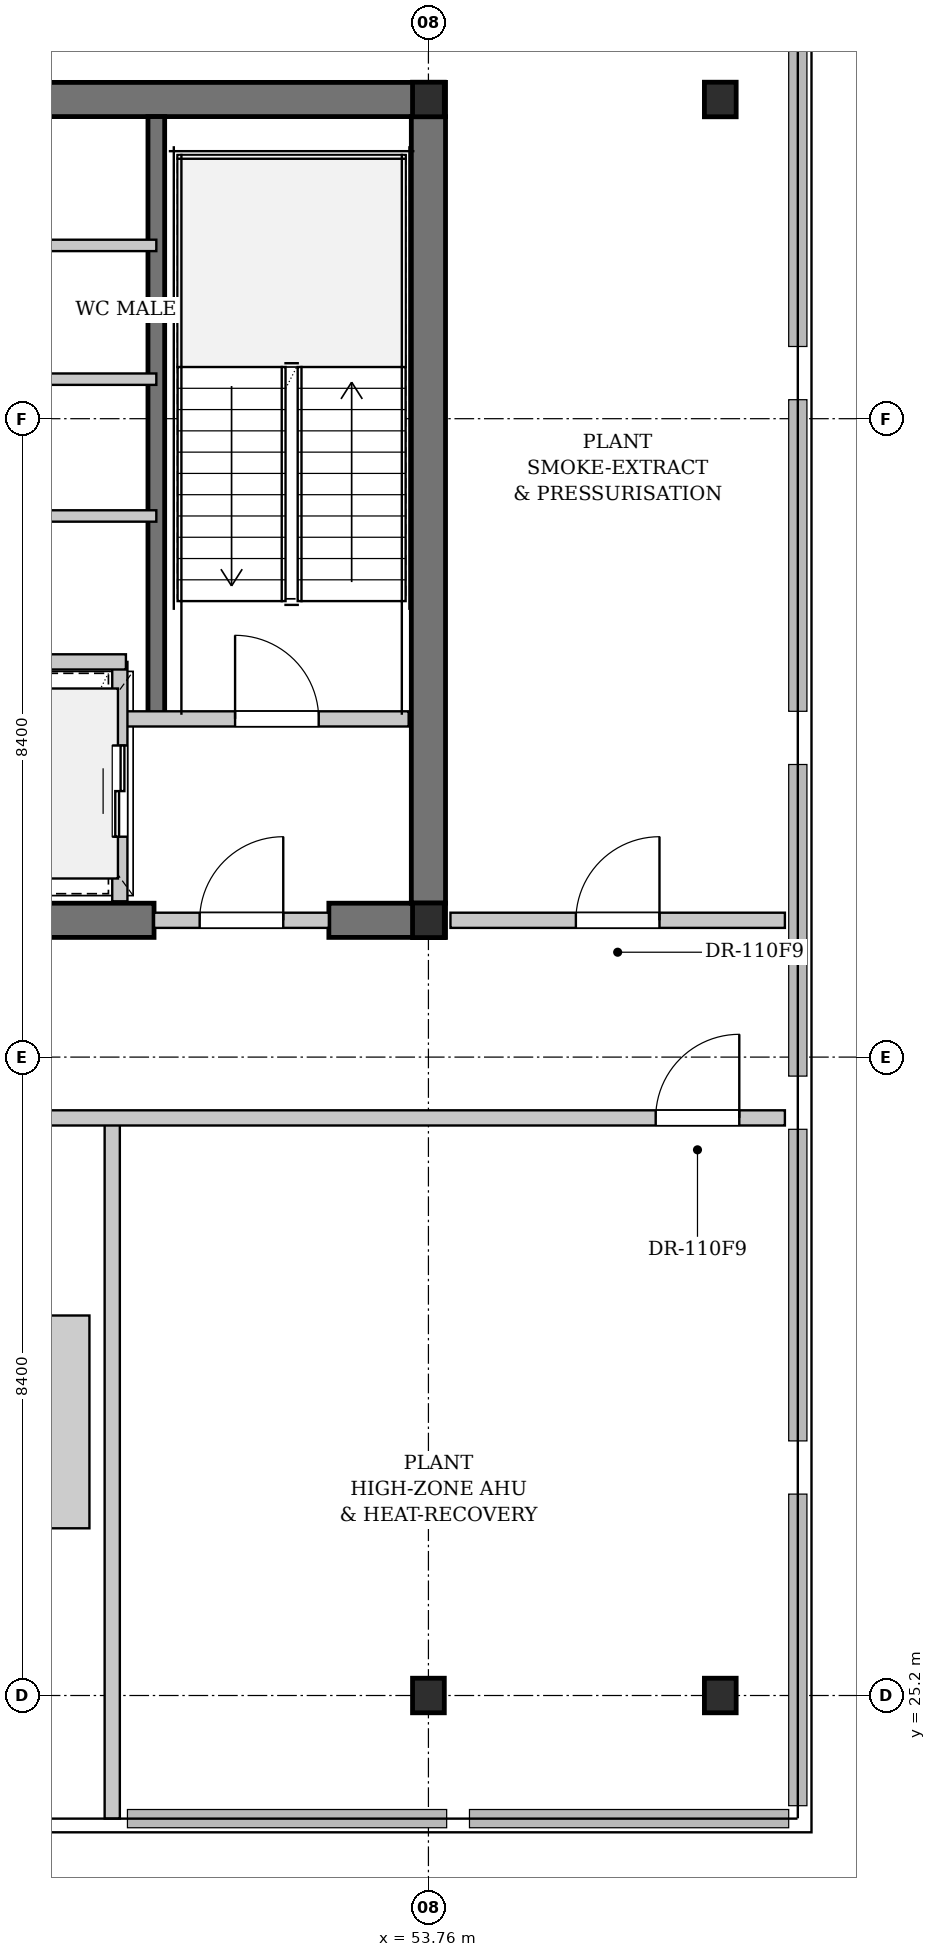
"""IFC4 building model, lengths in metres.
Left out: names, types, materials, properties, quantities, classifications, styles, units other than length and angle.
Written with IfcOpenShell. Run it as: python <this file> out.ifc"""

import sys

from ifc_helpers import new_model, si_unit, direction, frame, frame_2d, origin, origin_2d, place, context, subcontext, project, spatial, rectangle, i_section, extrude, element, fill, save


model = new_model("IFC4")
c1 = context("Model", 3, precision=1e-05, world=origin(), true_north=direction((0.0, 1.0)))
c2 = subcontext(c1, "Body", "Model", "MODEL_VIEW")
j1 = project(units=[si_unit("LENGTHUNIT", "METRE"), si_unit("PLANEANGLEUNIT", "RADIAN")], contexts=[c1])
p1 = place(None, origin())
s1 = spatial("IfcSite", under=j1, at=p1, CompositionType="ELEMENT")
p2 = place(p1, origin())
s2 = spatial("IfcBuilding", under=s1, at=p2, CompositionType="ELEMENT")
p3 = place(p2, frame((0.0, 0.0, 196.1)))
s3 = spatial("IfcBuildingStorey", under=s2, at=p3, CompositionType="ELEMENT", Elevation=196.1)
p4 = place(p3, frame((22.815, 46.2, 0.0), z_axis=(0.0, 0.0, 1.0), x_axis=(1.0, 0.0, 0.0)))
e1 = element("IfcWall", 1, at=p4, inside=s3, PredefinedType="SHEAR", context=c2, shape_type="SweptSolid", body=[
    extrude(rectangle(XDim=31.17, YDim=0.45, at=frame_2d((15.585, 0.0))), origin(), (0.0, 0.0, 1.0), 3.78),
])
p5 = place(p3, frame((42.1, 35.4, 0.0), z_axis=(0.0, 0.0, 1.0), x_axis=(1.0, 0.0, 0.0)))
e2 = element("IfcWall", 2, at=p5, inside=s3, PredefinedType="SHEAR", context=c2, shape_type="SweptSolid", body=[
    extrude(rectangle(XDim=8.05, YDim=0.45, at=frame_2d((4.025, 0.0))), origin(), (0.0, 0.0, 1.0), 3.78),
])
p6 = place(p5, frame((4.85, 0.0, 0.0)))
e3 = element("IfcOpeningElement", 3, at=p6, cuts=e2, PredefinedType="OPENING", context=c2, shape_type="SweptSolid", body=[
    extrude(rectangle(XDim=0.9, YDim=2.15, at=frame_2d((0.45, 1.075))), frame((0.0, 0.235, 0.0), z_axis=(0.0, -1.0, 0.0), x_axis=(1.0, 0.0, 0.0)), (0.0, 0.0, 1.0), 0.47),
])
p7 = place(p3, frame((52.45, 35.4, 0.0), z_axis=(0.0, 0.0, 1.0), x_axis=(1.0, 0.0, 0.0)))
e4 = element("IfcWall", 4, at=p7, inside=s3, PredefinedType="SHEAR", context=c2, shape_type="SweptSolid", body=[
    extrude(rectangle(XDim=1.535, YDim=0.45, at=frame_2d((0.768, 0.0))), origin(), (0.0, 0.0, 1.0), 3.78),
])
p8 = place(p3, frame((53.76, 35.625, 0.0), z_axis=(0.0, 0.0, 1.0), x_axis=(0.0, 1.0, 0.0)))
e5 = element("IfcWall", 5, at=p8, inside=s3, PredefinedType="SHEAR", context=c2, shape_type="SweptSolid", body=[
    extrude(rectangle(XDim=10.35, YDim=0.45, at=frame_2d((5.175, 0.0))), origin(), (0.0, 0.0, 1.0), 3.78),
])
p9 = place(p3, frame((50.18, 38.05, 0.0), z_axis=(0.0, 0.0, 1.0), x_axis=(0.0, 1.0, 0.0)))
e6 = element("IfcWall", 6, at=p9, inside=s3, PredefinedType="SHEAR", context=c2, shape_type="SweptSolid", body=[
    extrude(rectangle(XDim=7.925, YDim=0.22, at=frame_2d((3.962, 0.0))), origin(), (0.0, 0.0, 1.0), 3.78),
])
for number, where, z_axis, x_axis in (
    (7, (53.76, 35.4, 0.0), (0.0, 0.0, 1.0), (1.0, 0.0, 0.0)),
    (8, (53.76, 46.2, 0.0), (0.0, 0.0, 1.0), (1.0, 0.0, 0.0)),
    (9, (53.76, 25.2, 0.0), (0.0, 0.0, 1.0), (1.0, 0.0, 0.0)),
    (10, (57.6, 25.2, 0.0), (0.0, 0.0, 1.0), (1.0, 0.0, 0.0)),
    (11, (57.6, 46.2, 0.0), (0.0, 0.0, 1.0), (1.0, 0.0, 0.0)),
):
    element("IfcColumn", number, at=place(p3, frame(where, z_axis=z_axis, x_axis=x_axis)), inside=s3, PredefinedType="COLUMN", context=c2, shape_type="SweptSolid", body=[
        extrude(i_section(OverallWidth=0.418, OverallDepth=0.455, WebThickness=0.042, FlangeThickness=0.068, FilletRadius=0.015, at=origin_2d()), origin(), (0.0, 0.0, 1.0), 4.2),
    ])
p10 = place(p3, frame((49.78, 38.05, 0.0), z_axis=(0.0, 0.0, 1.0), x_axis=(1.0, 0.0, 0.0)))
e12 = element("IfcWall", 12, at=p10, inside=s3, PredefinedType="PARTITIONING", context=c2, shape_type="SweptSolid", body=[
    extrude(rectangle(XDim=3.72, YDim=0.2, at=frame_2d((1.86, 0.0))), origin(), (0.0, 0.0, 1.0), 3.78),
])
p11 = place(p10, frame((1.436, 0.0, 0.0)))
e13 = element("IfcOpeningElement", 13, at=p11, cuts=e12, PredefinedType="OPENING", context=c2, shape_type="SweptSolid", body=[
    extrude(rectangle(XDim=1.1, YDim=2.15, at=frame_2d((0.55, 1.075))), frame((0.0, 0.11, 0.0), z_axis=(0.0, -1.0, 0.0), x_axis=(1.0, 0.0, 0.0)), (0.0, 0.0, 1.0), 0.22),
])
p12 = place(p3, frame((50.15, 35.4, 0.0), z_axis=(0.0, 0.0, 1.0), x_axis=(1.0, 0.0, 0.0)))
e14 = element("IfcWall", 14, at=p12, inside=s3, PredefinedType="PARTITIONING", context=c2, shape_type="SweptSolid", body=[
    extrude(rectangle(XDim=2.3, YDim=0.2, at=frame_2d((1.15, 0.0))), origin(), (0.0, 0.0, 1.0), 2.961),
])
p13 = place(p12, frame((0.6, 0.0, 0.0)))
e15 = element("IfcOpeningElement", 15, at=p13, cuts=e14, PredefinedType="OPENING", context=c2, shape_type="SweptSolid", body=[
    extrude(rectangle(XDim=1.1, YDim=2.15, at=frame_2d((0.55, 1.075))), frame((0.0, 0.11, 0.0), z_axis=(0.0, -1.0, 0.0), x_axis=(1.0, 0.0, 0.0)), (0.0, 0.0, 1.0), 0.22),
])
p14 = place(p3, frame((49.7, 35.65, 0.0), z_axis=(0.0, 0.0, 1.0), x_axis=(0.0, 1.0, 0.0)))
e16 = element("IfcWall", 16, at=p14, inside=s3, PredefinedType="PARTITIONING", context=c2, shape_type="SweptSolid", body=[
    extrude(rectangle(XDim=3.15, YDim=0.2, at=frame_2d((1.575, 0.0))), origin(), (0.0, 0.0, 1.0), 3.78),
])
p15 = place(p14, frame((0.85, 0.0, 0.0)))
e17 = element("IfcOpeningElement", 17, at=p15, cuts=e16, PredefinedType="OPENING", context=c2, shape_type="SweptSolid", body=[
    extrude(rectangle(XDim=1.2, YDim=2.2, at=frame_2d((0.6, 1.1))), frame((0.0, 0.11, 0.0), z_axis=(0.0, -1.0, 0.0), x_axis=(1.0, 0.0, 0.0)), (0.0, 0.0, 1.0), 0.22),
])
p16 = place(p3, frame((47.92, 38.8, 0.0), z_axis=(0.0, 0.0, 1.0), x_axis=(1.0, 0.0, 0.0)))
e18 = element("IfcWall", 18, at=p16, inside=s3, PredefinedType="PARTITIONING", context=c2, shape_type="SweptSolid", body=[
    extrude(rectangle(XDim=1.86, YDim=0.2, at=frame_2d((0.93, 0.0))), origin(), (0.0, 0.0, 1.0), 3.78),
])
for number, where, z_axis, x_axis in (
    (19, (47.88, 40.72, 0.0), (0.0, 0.0, 1.0), (1.0, 0.0, 0.0)),
    (20, (47.88, 42.52, 0.0), (0.0, 0.0, 1.0), (1.0, 0.0, 0.0)),
    (21, (47.88, 44.28, 0.0), (0.0, 0.0, 1.0), (1.0, 0.0, 0.0)),
):
    element("IfcWall", number, at=place(p3, frame(where, z_axis=z_axis, x_axis=x_axis)), inside=s3, PredefinedType="PARTITIONING", context=c2, shape_type="SweptSolid", body=[
        extrude(rectangle(XDim=2.3, YDim=0.15, at=frame_2d((1.15, 0.0))), origin(), (0.0, 0.0, 1.0), 3.78),
    ])
p17 = place(p3, frame((54.05, 35.4, 0.0), z_axis=(0.0, 0.0, 1.0), x_axis=(1.0, 0.0, 0.0)))
e22 = element("IfcWall", 22, at=p17, inside=s3, PredefinedType="PARTITIONING", context=c2, shape_type="SweptSolid", body=[
    extrude(rectangle(XDim=4.4, YDim=0.2, at=frame_2d((2.2, 0.0))), origin(), (0.0, 0.0, 1.0), 3.78),
])
p18 = place(p17, frame((1.65, 0.0, 0.0)))
e23 = element("IfcOpeningElement", 23, at=p18, cuts=e22, PredefinedType="OPENING", context=c2, shape_type="SweptSolid", body=[
    extrude(rectangle(XDim=1.1, YDim=2.15, at=frame_2d((0.55, 1.075))), frame((0.0, 0.11, 0.0), z_axis=(0.0, -1.0, 0.0), x_axis=(1.0, 0.0, 0.0)), (0.0, 0.0, 1.0), 0.22),
])
p19 = place(p3, frame((49.6, 23.58, 0.0), z_axis=(0.0, 0.0, 1.0), x_axis=(0.0, 1.0, 0.0)))
e24 = element("IfcWall", 24, at=p19, inside=s3, PredefinedType="PARTITIONING", context=c2, shape_type="SweptSolid", body=[
    extrude(rectangle(XDim=9.22, YDim=0.2, at=frame_2d((4.61, 0.0))), origin(), (0.0, 0.0, 1.0), 3.78),
])
p20 = place(p3, frame((18.35, 32.8, 0.0), z_axis=(0.0, 0.0, 1.0), x_axis=(1.0, 0.0, 0.0)))
e25 = element("IfcWall", 25, at=p20, inside=s3, PredefinedType="PARTITIONING", context=c2, shape_type="SweptSolid", body=[
    extrude(rectangle(XDim=40.1, YDim=0.2, at=frame_2d((20.05, 0.0))), origin(), (0.0, 0.0, 1.0), 3.78),
])
p21 = place(p20, frame((0.6, 0.0, 0.0)))
e26 = element("IfcOpeningElement", 26, at=p21, cuts=e25, PredefinedType="OPENING", context=c2, shape_type="SweptSolid", body=[
    extrude(rectangle(XDim=1.1, YDim=2.15, at=frame_2d((0.55, 1.075))), frame((0.0, 0.11, 0.0), z_axis=(0.0, -1.0, 0.0), x_axis=(1.0, 0.0, 0.0)), (0.0, 0.0, 1.0), 0.22),
])
p22 = place(p20, frame((38.4, 0.0, 0.0)))
e27 = element("IfcOpeningElement", 27, at=p22, cuts=e25, PredefinedType="OPENING", context=c2, shape_type="SweptSolid", body=[
    extrude(rectangle(XDim=1.1, YDim=2.15, at=frame_2d((0.55, 1.075))), frame((0.0, 0.11, 0.0), z_axis=(0.0, -1.0, 0.0), x_axis=(1.0, 0.0, 0.0)), (0.0, 0.0, 1.0), 0.22),
])
p23 = place(p11, origin())
e28 = element("IfcDoor", 28, at=p23, inside=s3, OperationType="SINGLE_SWING_LEFT", PredefinedType="DOOR", context=c2, shape_type="SweptSolid", body=[
    extrude(rectangle(XDim=1.1, YDim=2.15, at=frame_2d((0.55, 1.075))), frame((0.0, 0.025, 0.0), z_axis=(0.0, -1.0, 0.0), x_axis=(1.0, 0.0, 0.0)), (0.0, 0.0, 1.0), 0.05),
])
fill(e13, e28)
p24 = place(p13, origin())
e29 = element("IfcDoor", 29, at=p24, inside=s3, OperationType="SINGLE_SWING_RIGHT", PredefinedType="DOOR", context=c2, shape_type="SweptSolid", body=[
    extrude(rectangle(XDim=1.1, YDim=2.15, at=frame_2d((0.55, 1.075))), frame((0.0, 0.025, 0.0), z_axis=(0.0, -1.0, 0.0), x_axis=(1.0, 0.0, 0.0)), (0.0, 0.0, 1.0), 0.05),
])
fill(e15, e29)
p25 = place(p15, origin())
e30 = element("IfcDoor", 30, at=p25, inside=s3, OperationType="DOUBLE_DOOR_SLIDING", PredefinedType="DOOR", context=c2, shape_type="SweptSolid", body=[
    extrude(rectangle(XDim=1.2, YDim=2.2, at=frame_2d((0.6, 1.1))), frame((0.0, 0.025, 0.0), z_axis=(0.0, -1.0, 0.0), x_axis=(1.0, 0.0, 0.0)), (0.0, 0.0, 1.0), 0.05),
])
fill(e17, e30)
p26 = place(p18, origin())
e31 = element("IfcDoor", 31, at=p26, inside=s3, OperationType="SINGLE_SWING_RIGHT", PredefinedType="DOOR", context=c2, shape_type="SweptSolid", body=[
    extrude(rectangle(XDim=1.1, YDim=2.15, at=frame_2d((0.55, 1.075))), frame((0.0, 0.025, 0.0), z_axis=(0.0, -1.0, 0.0), x_axis=(1.0, 0.0, 0.0)), (0.0, 0.0, 1.0), 0.05),
])
fill(e23, e31)
p27 = place(p22, origin())
e32 = element("IfcDoor", 32, at=p27, inside=s3, OperationType="SINGLE_SWING_RIGHT", PredefinedType="DOOR", context=c2, shape_type="SweptSolid", body=[
    extrude(rectangle(XDim=1.1, YDim=2.15, at=frame_2d((0.55, 1.075))), frame((0.0, 0.025, 0.0), z_axis=(0.0, -1.0, 0.0), x_axis=(1.0, 0.0, 0.0)), (0.0, 0.0, 1.0), 0.05),
])
fill(e27, e32)
save(model, sys.argv[1])
